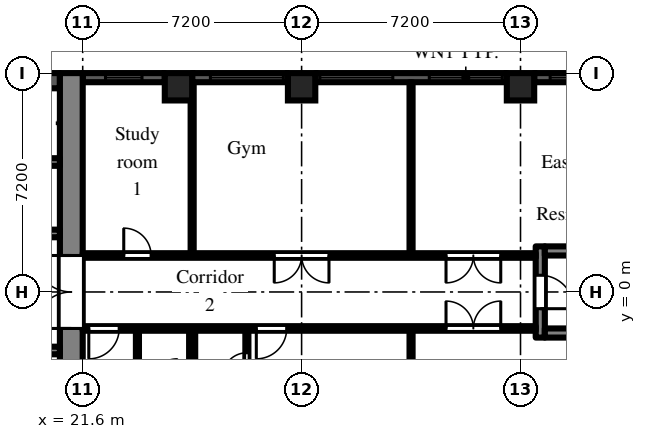
"""IFC4 building model, lengths in metres.
Left out: names, types, materials, properties, quantities, classifications, styles, units other than length and angle.
Written with IfcOpenShell. Run it as: python <this file> out.ifc"""

import sys

from ifc_helpers import new_model, si_unit, direction, frame, frame_2d, origin, origin_2d, place, context, subcontext, project, spatial, rectangle, extrude, element, fill, save


model = new_model("IFC4")
c1 = context("Model", 3, precision=1e-05, world=origin(), true_north=direction((0.0, 1.0)))
c2 = subcontext(c1, "Body", "Model", "MODEL_VIEW")
j1 = project(units=[si_unit("LENGTHUNIT", "METRE"), si_unit("PLANEANGLEUNIT", "RADIAN")], contexts=[c1])
p1 = place(None, origin())
s1 = spatial("IfcSite", under=j1, at=p1, CompositionType="ELEMENT")
p2 = place(p1, origin())
s2 = spatial("IfcBuilding", under=s1, at=p2, CompositionType="ELEMENT")
p3 = place(p2, frame((0.0, 0.0, 66.9)))
s3 = spatial("IfcBuildingStorey", under=s2, at=p3, CompositionType="ELEMENT", Elevation=66.9)
for number, where, z_axis, x_axis in (
    (1, (24.75, 6.75, 0.0), (0.0, 0.0, 1.0), (1.0, 0.0, 0.0)),
    (2, (28.8, 6.75, 0.0), (0.0, 0.0, 1.0), (1.0, 0.0, 0.0)),
    (3, (36.0, 6.75, 0.0), (0.0, 0.0, 1.0), (1.0, 0.0, 0.0)),
):
    element("IfcColumn", number, at=place(p3, frame(where, z_axis=z_axis, x_axis=x_axis)), inside=s3, PredefinedType="COLUMN", context=c2, shape_type="SweptSolid", body=[
        extrude(rectangle(XDim=0.9, YDim=0.9, at=origin_2d()), origin(), (0.0, 0.0, 1.0), 3.0),
    ])
p4 = place(p3, frame((38.7, 7.05, 0.0), z_axis=(0.0, 0.0, 1.0), x_axis=(-1.0, 0.0, 0.0)))
e4 = element("IfcWall", 4, at=p4, inside=s3, PredefinedType="SOLIDWALL", context=c2, shape_type="SweptSolid", body=[
    extrude(rectangle(XDim=2.25, YDim=0.3, at=frame_2d((1.125, 0.0))), origin(), (0.0, 0.0, 1.0), 2.1),
])
p5 = place(p4, frame((0.525, 0.0, 0.2)))
e5 = element("IfcOpeningElement", 5, at=p5, cuts=e4, PredefinedType="OPENING", context=c2, shape_type="SweptSolid", body=[
    extrude(rectangle(XDim=1.2, YDim=1.85, at=frame_2d((0.6, 0.925))), frame((0.0, 0.16, 0.0), z_axis=(0.0, -1.0, 0.0), x_axis=(1.0, 0.0, 0.0)), (0.0, 0.0, 1.0), 0.32),
])
p6 = place(p3, frame((35.55, 7.05, 0.0), z_axis=(0.0, 0.0, 1.0), x_axis=(-1.0, 0.0, 0.0)))
e6 = element("IfcWall", 6, at=p6, inside=s3, PredefinedType="SOLIDWALL", context=c2, shape_type="SweptSolid", body=[
    extrude(rectangle(XDim=6.3, YDim=0.3, at=frame_2d((3.15, 0.0))), origin(), (0.0, 0.0, 1.0), 2.1),
])
p7 = place(p6, frame((0.15, 0.0, 0.2)))
e7 = element("IfcOpeningElement", 7, at=p7, cuts=e6, PredefinedType="OPENING", context=c2, shape_type="SweptSolid", body=[
    extrude(rectangle(XDim=2.4, YDim=1.85, at=frame_2d((1.2, 0.925))), frame((0.0, 0.16, 0.0), z_axis=(0.0, -1.0, 0.0), x_axis=(1.0, 0.0, 0.0)), (0.0, 0.0, 1.0), 0.32),
])
p8 = place(p6, frame((3.75, 0.0, 0.2)))
e8 = element("IfcOpeningElement", 8, at=p8, cuts=e6, PredefinedType="OPENING", context=c2, shape_type="SweptSolid", body=[
    extrude(rectangle(XDim=2.4, YDim=1.85, at=frame_2d((1.2, 0.925))), frame((0.0, 0.16, 0.0), z_axis=(0.0, -1.0, 0.0), x_axis=(1.0, 0.0, 0.0)), (0.0, 0.0, 1.0), 0.32),
])
p9 = place(p3, frame((28.35, 7.05, 0.0), z_axis=(0.0, 0.0, 1.0), x_axis=(-1.0, 0.0, 0.0)))
e9 = element("IfcWall", 9, at=p9, inside=s3, PredefinedType="SOLIDWALL", context=c2, shape_type="SweptSolid", body=[
    extrude(rectangle(XDim=3.15, YDim=0.3, at=frame_2d((1.575, 0.0))), origin(), (0.0, 0.0, 1.0), 2.1),
])
p10 = place(p9, frame((0.15, 0.0, 0.2)))
e10 = element("IfcOpeningElement", 10, at=p10, cuts=e9, PredefinedType="OPENING", context=c2, shape_type="SweptSolid", body=[
    extrude(rectangle(XDim=2.4, YDim=1.85, at=frame_2d((1.2, 0.925))), frame((0.0, 0.16, 0.0), z_axis=(0.0, -1.0, 0.0), x_axis=(1.0, 0.0, 0.0)), (0.0, 0.0, 1.0), 0.32),
])
p11 = place(p3, frame((24.3, 7.05, 0.0), z_axis=(0.0, 0.0, 1.0), x_axis=(-1.0, 0.0, 0.0)))
e11 = element("IfcWall", 11, at=p11, inside=s3, PredefinedType="SOLIDWALL", context=c2, shape_type="SweptSolid", body=[
    extrude(rectangle(XDim=2.7, YDim=0.3, at=frame_2d((1.35, 0.0))), origin(), (0.0, 0.0, 1.0), 2.1),
])
p12 = place(p11, frame((0.75, 0.0, 0.2)))
e12 = element("IfcOpeningElement", 12, at=p12, cuts=e11, PredefinedType="OPENING", context=c2, shape_type="SweptSolid", body=[
    extrude(rectangle(XDim=1.2, YDim=1.85, at=frame_2d((0.6, 0.925))), frame((0.0, 0.16, 0.0), z_axis=(0.0, -1.0, 0.0), x_axis=(1.0, 0.0, 0.0)), (0.0, 0.0, 1.0), 0.32),
])
p13 = place(p3, frame((21.225, -7.2, 0.0), z_axis=(0.0, 0.0, 1.0), x_axis=(0.0, 1.0, 0.0)))
e13 = element("IfcWall", 13, at=p13, inside=s3, PredefinedType="SHEAR", context=c2, shape_type="SweptSolid", body=[
    extrude(rectangle(XDim=14.4, YDim=0.75, at=frame_2d((7.2, 0.0))), origin(), (0.0, 0.0, 1.0), 2.575),
])
p14 = place(p13, frame((6.0, 0.0, 0.0)))
e14 = element("IfcOpeningElement", 14, at=p14, cuts=e13, PredefinedType="OPENING", context=c2, shape_type="SweptSolid", body=[
    extrude(rectangle(XDim=2.4, YDim=2.2, at=frame_2d((1.2, 1.1))), frame((0.0, 0.385, 0.0), z_axis=(0.0, -1.0, 0.0), x_axis=(1.0, 0.0, 0.0)), (0.0, 0.0, 1.0), 0.77),
])
p15 = place(p3, frame((7.9, 6.95, 0.0), z_axis=(0.0, 0.0, 1.0), x_axis=(1.0, 0.0, 0.0)))
e15 = element("IfcWall", 15, at=p15, inside=s3, PredefinedType="SHEAR", context=c2, shape_type="SweptSolid", body=[
    extrude(rectangle(XDim=12.95, YDim=0.5, at=frame_2d((6.475, 0.0))), origin(), (0.0, 0.0, 1.0), 2.575),
])
p16 = place(p3, frame((7.9, 1.925, 0.0), z_axis=(0.0, 0.0, 1.0), x_axis=(1.0, 0.0, 0.0)))
e16 = element("IfcWall", 16, at=p16, inside=s3, PredefinedType="SHEAR", context=c2, shape_type="SweptSolid", body=[
    extrude(rectangle(XDim=12.95, YDim=0.25, at=frame_2d((6.475, 0.0))), origin(), (0.0, 0.0, 1.0), 2.575),
])
p17 = place(p16, frame((0.525, 0.0, 0.0)))
e17 = element("IfcOpeningElement", 17, at=p17, cuts=e16, PredefinedType="OPENING", context=c2, shape_type="SweptSolid", body=[
    extrude(rectangle(XDim=0.9, YDim=2.1, at=frame_2d((0.45, 1.05))), frame((0.0, 0.135, 0.0), z_axis=(0.0, -1.0, 0.0), x_axis=(1.0, 0.0, 0.0)), (0.0, 0.0, 1.0), 0.27),
])
p18 = place(p16, frame((2.625, 0.0, 0.0)))
e18 = element("IfcOpeningElement", 18, at=p18, cuts=e16, PredefinedType="OPENING", context=c2, shape_type="SweptSolid", body=[
    extrude(rectangle(XDim=1.1, YDim=2.1, at=frame_2d((0.55, 1.05))), frame((0.0, 0.135, 0.0), z_axis=(0.0, -1.0, 0.0), x_axis=(1.0, 0.0, 0.0)), (0.0, 0.0, 1.0), 0.27),
])
p19 = place(p16, frame((7.125, 0.0, 0.0)))
e19 = element("IfcOpeningElement", 19, at=p19, cuts=e16, PredefinedType="OPENING", context=c2, shape_type="SweptSolid", body=[
    extrude(rectangle(XDim=0.9, YDim=2.1, at=frame_2d((0.45, 1.05))), frame((0.0, 0.135, 0.0), z_axis=(0.0, -1.0, 0.0), x_axis=(1.0, 0.0, 0.0)), (0.0, 0.0, 1.0), 0.27),
])
p20 = place(p3, frame((12.3, 4.275, 0.0), z_axis=(0.0, 0.0, 1.0), x_axis=(1.0, 0.0, 0.0)))
e20 = element("IfcWall", 20, at=p20, inside=s3, PredefinedType="SHEAR", context=c2, shape_type="SweptSolid", body=[
    extrude(rectangle(XDim=8.55, YDim=0.25, at=frame_2d((4.275, 0.0))), origin(), (0.0, 0.0, 1.0), 2.575),
])
p21 = place(p3, frame((7.9, -1.925, 0.0), z_axis=(0.0, 0.0, 1.0), x_axis=(1.0, 0.0, 0.0)))
e21 = element("IfcWall", 21, at=p21, inside=s3, PredefinedType="SHEAR", context=c2, shape_type="SweptSolid", body=[
    extrude(rectangle(XDim=12.95, YDim=0.25, at=frame_2d((6.475, 0.0))), origin(), (0.0, 0.0, 1.0), 2.575),
])
p22 = place(p21, frame((4.825, 0.0, 0.0)))
e22 = element("IfcOpeningElement", 22, at=p22, cuts=e21, PredefinedType="OPENING", context=c2, shape_type="SweptSolid", body=[
    extrude(rectangle(XDim=1.1, YDim=2.1, at=frame_2d((0.55, 1.05))), frame((0.0, 0.135, 0.0), z_axis=(0.0, -1.0, 0.0), x_axis=(1.0, 0.0, 0.0)), (0.0, 0.0, 1.0), 0.27),
])
p23 = place(p21, frame((7.025, 0.0, 0.0)))
e23 = element("IfcOpeningElement", 23, at=p23, cuts=e21, PredefinedType="OPENING", context=c2, shape_type="SweptSolid", body=[
    extrude(rectangle(XDim=1.1, YDim=2.1, at=frame_2d((0.55, 1.05))), frame((0.0, 0.135, 0.0), z_axis=(0.0, -1.0, 0.0), x_axis=(1.0, 0.0, 0.0)), (0.0, 0.0, 1.0), 0.27),
])
p24 = place(p21, frame((9.225, 0.0, 0.0)))
e24 = element("IfcOpeningElement", 24, at=p24, cuts=e21, PredefinedType="OPENING", context=c2, shape_type="SweptSolid", body=[
    extrude(rectangle(XDim=1.1, YDim=2.1, at=frame_2d((0.55, 1.05))), frame((0.0, 0.135, 0.0), z_axis=(0.0, -1.0, 0.0), x_axis=(1.0, 0.0, 0.0)), (0.0, 0.0, 1.0), 0.27),
])
p25 = place(p21, frame((0.525, 0.0, 0.0)))
e25 = element("IfcOpeningElement", 25, at=p25, cuts=e21, PredefinedType="OPENING", context=c2, shape_type="SweptSolid", body=[
    extrude(rectangle(XDim=0.9, YDim=2.1, at=frame_2d((0.45, 1.05))), frame((0.0, 0.135, 0.0), z_axis=(0.0, -1.0, 0.0), x_axis=(1.0, 0.0, 0.0)), (0.0, 0.0, 1.0), 0.27),
])
p26 = place(p21, frame((2.625, 0.0, 0.0)))
e26 = element("IfcOpeningElement", 26, at=p26, cuts=e21, PredefinedType="OPENING", context=c2, shape_type="SweptSolid", body=[
    extrude(rectangle(XDim=1.1, YDim=2.1, at=frame_2d((0.55, 1.05))), frame((0.0, 0.135, 0.0), z_axis=(0.0, -1.0, 0.0), x_axis=(1.0, 0.0, 0.0)), (0.0, 0.0, 1.0), 0.27),
])
p27 = place(p3, frame((36.65, -1.5, 0.0), z_axis=(0.0, 0.0, 1.0), x_axis=(0.0, 1.0, 0.0)))
e27 = element("IfcWall", 27, at=p27, inside=s3, PredefinedType="SHEAR", context=c2, shape_type="SweptSolid", body=[
    extrude(rectangle(XDim=3.0, YDim=0.3, at=frame_2d((1.5, 0.0))), origin(), (0.0, 0.0, 1.0), 2.575),
])
p28 = place(p27, frame((0.95, 0.0, 0.0)))
e28 = element("IfcOpeningElement", 28, at=p28, cuts=e27, PredefinedType="OPENING", context=c2, shape_type="SweptSolid", body=[
    extrude(rectangle(XDim=1.1, YDim=2.1, at=frame_2d((0.55, 1.05))), frame((0.0, 0.16, 0.0), z_axis=(0.0, -1.0, 0.0), x_axis=(1.0, 0.0, 0.0)), (0.0, 0.0, 1.0), 0.32),
])
for number, where, z_axis, x_axis in (
    (29, (36.8, -1.35, 0.0), (0.0, 0.0, 1.0), (1.0, 0.0, 0.0)),
    (30, (36.8, 1.35, 0.0), (0.0, 0.0, 1.0), (1.0, 0.0, 0.0)),
):
    element("IfcWall", number, at=place(p3, frame(where, z_axis=z_axis, x_axis=x_axis)), inside=s3, PredefinedType="SHEAR", context=c2, shape_type="SweptSolid", body=[
        extrude(rectangle(XDim=5.8, YDim=0.3, at=frame_2d((2.9, 0.0))), origin(), (0.0, 0.0, 1.0), 2.575),
    ])
p29 = place(p3, frame((21.6, -1.2, 0.0), z_axis=(0.0, 0.0, 1.0), x_axis=(1.0, 0.0, 0.0)))
e31 = element("IfcWall", 31, at=p29, inside=s3, PredefinedType="PARTITIONING", context=c2, shape_type="SweptSolid", body=[
    extrude(rectangle(XDim=14.9, YDim=0.15, at=frame_2d((7.45, 0.0))), origin(), (0.0, 0.0, 1.0), 2.575),
])
p30 = place(p29, frame((0.2, 0.0, 0.0)))
e32 = element("IfcOpeningElement", 32, at=p30, cuts=e31, PredefinedType="OPENING", context=c2, shape_type="SweptSolid", body=[
    extrude(rectangle(XDim=1.0, YDim=2.1, at=frame_2d((0.5, 1.05))), frame((0.0, 0.085, 0.0), z_axis=(0.0, -1.0, 0.0), x_axis=(1.0, 0.0, 0.0)), (0.0, 0.0, 1.0), 0.17),
])
p31 = place(p29, frame((5.71, 0.0, 0.0)))
e33 = element("IfcOpeningElement", 33, at=p31, cuts=e31, PredefinedType="OPENING", context=c2, shape_type="SweptSolid", body=[
    extrude(rectangle(XDim=1.0, YDim=2.1, at=frame_2d((0.5, 1.05))), frame((0.0, 0.085, 0.0), z_axis=(0.0, -1.0, 0.0), x_axis=(1.0, 0.0, 0.0)), (0.0, 0.0, 1.0), 0.17),
])
p32 = place(p29, frame((11.95, 0.0, 0.0)))
e34 = element("IfcOpeningElement", 34, at=p32, cuts=e31, PredefinedType="OPENING", context=c2, shape_type="SweptSolid", body=[
    extrude(rectangle(XDim=1.8, YDim=2.1, at=frame_2d((0.9, 1.05))), frame((0.0, 0.085, 0.0), z_axis=(0.0, -1.0, 0.0), x_axis=(1.0, 0.0, 0.0)), (0.0, 0.0, 1.0), 0.17),
])
p33 = place(p3, frame((21.6, 1.2, 0.0), z_axis=(0.0, 0.0, 1.0), x_axis=(1.0, 0.0, 0.0)))
e35 = element("IfcWall", 35, at=p33, inside=s3, PredefinedType="PARTITIONING", context=c2, shape_type="SweptSolid", body=[
    extrude(rectangle(XDim=14.9, YDim=0.15, at=frame_2d((7.45, 0.0))), origin(), (0.0, 0.0, 1.0), 2.575),
])
p34 = place(p33, frame((1.35, 0.0, 0.0)))
e36 = element("IfcOpeningElement", 36, at=p34, cuts=e35, PredefinedType="OPENING", context=c2, shape_type="SweptSolid", body=[
    extrude(rectangle(XDim=0.9, YDim=2.1, at=frame_2d((0.45, 1.05))), frame((0.0, 0.085, 0.0), z_axis=(0.0, -1.0, 0.0), x_axis=(1.0, 0.0, 0.0)), (0.0, 0.0, 1.0), 0.17),
])
p35 = place(p33, frame((6.3, 0.0, 0.0)))
e37 = element("IfcOpeningElement", 37, at=p35, cuts=e35, PredefinedType="OPENING", context=c2, shape_type="SweptSolid", body=[
    extrude(rectangle(XDim=1.8, YDim=2.1, at=frame_2d((0.9, 1.05))), frame((0.0, 0.085, 0.0), z_axis=(0.0, -1.0, 0.0), x_axis=(1.0, 0.0, 0.0)), (0.0, 0.0, 1.0), 0.17),
])
p36 = place(p33, frame((11.95, 0.0, 0.0)))
e38 = element("IfcOpeningElement", 38, at=p36, cuts=e35, PredefinedType="OPENING", context=c2, shape_type="SweptSolid", body=[
    extrude(rectangle(XDim=1.8, YDim=2.1, at=frame_2d((0.9, 1.05))), frame((0.0, 0.085, 0.0), z_axis=(0.0, -1.0, 0.0), x_axis=(1.0, 0.0, 0.0)), (0.0, 0.0, 1.0), 0.17),
])
p37 = place(p3, frame((23.4, -3.05, 0.0), z_axis=(0.0, 0.0, 1.0), x_axis=(0.0, 1.0, 0.0)))
e39 = element("IfcWall", 39, at=p37, inside=s3, PredefinedType="PARTITIONING", context=c2, shape_type="SweptSolid", body=[
    extrude(rectangle(XDim=1.775, YDim=0.1, at=frame_2d((0.888, 0.0))), origin(), (0.0, 0.0, 1.0), 2.575),
])
p38 = place(p3, frame((25.2, -6.9, 0.0), z_axis=(0.0, 0.0, 1.0), x_axis=(0.0, 1.0, 0.0)))
e40 = element("IfcWall", 40, at=p38, inside=s3, PredefinedType="PARTITIONING", context=c2, shape_type="SweptSolid", body=[
    extrude(rectangle(XDim=5.625, YDim=0.2, at=frame_2d((2.812, 0.0))), origin(), (0.0, 0.0, 1.0), 2.575),
])
p39 = place(p3, frame((25.2, 1.275, 0.0), z_axis=(0.0, 0.0, 1.0), x_axis=(0.0, 1.0, 0.0)))
e41 = element("IfcWall", 41, at=p39, inside=s3, PredefinedType="PARTITIONING", context=c2, shape_type="SweptSolid", body=[
    extrude(rectangle(XDim=5.625, YDim=0.1, at=frame_2d((2.812, 0.0))), origin(), (0.0, 0.0, 1.0), 2.575),
])
p40 = place(p3, frame((27.0, -3.55, 0.0), z_axis=(0.0, 0.0, 1.0), x_axis=(0.0, 1.0, 0.0)))
e42 = element("IfcWall", 42, at=p40, inside=s3, PredefinedType="PARTITIONING", context=c2, shape_type="SweptSolid", body=[
    extrude(rectangle(XDim=2.275, YDim=0.1, at=frame_2d((1.138, 0.0))), origin(), (0.0, 0.0, 1.0), 2.575),
])
p41 = place(p40, frame((0.75, 0.0, 0.0)))
e43 = element("IfcOpeningElement", 43, at=p41, cuts=e42, PredefinedType="OPENING", context=c2, shape_type="SweptSolid", body=[
    extrude(rectangle(XDim=0.8, YDim=2.1, at=frame_2d((0.4, 1.05))), frame((0.0, 0.06, 0.0), z_axis=(0.0, -1.0, 0.0), x_axis=(1.0, 0.0, 0.0)), (0.0, 0.0, 1.0), 0.12),
])
for number, where, z_axis, x_axis in (
    (44, (32.4, -6.9, 0.0), (0.0, 0.0, 1.0), (0.0, 1.0, 0.0)),
    (45, (32.4, 1.275, 0.0), (0.0, 0.0, 1.0), (0.0, 1.0, 0.0)),
):
    element("IfcWall", number, at=place(p3, frame(where, z_axis=z_axis, x_axis=x_axis)), inside=s3, PredefinedType="PARTITIONING", context=c2, shape_type="SweptSolid", body=[
        extrude(rectangle(XDim=5.625, YDim=0.1, at=frame_2d((2.812, 0.0))), origin(), (0.0, 0.0, 1.0), 2.575),
    ])
p42 = place(p5, origin())
e46 = element("IfcWindow", 46, at=p42, inside=s3, PartitioningType="SINGLE_PANEL", PredefinedType="WINDOW", context=c2, shape_type="SweptSolid", body=[
    extrude(rectangle(XDim=1.2, YDim=1.85, at=frame_2d((0.6, 0.925))), frame((0.0, 0.03, 0.0), z_axis=(0.0, -1.0, 0.0), x_axis=(1.0, 0.0, 0.0)), (0.0, 0.0, 1.0), 0.06),
])
fill(e5, e46)
p43 = place(p7, origin())
e47 = element("IfcWindow", 47, at=p43, inside=s3, PartitioningType="SINGLE_PANEL", PredefinedType="WINDOW", context=c2, shape_type="SweptSolid", body=[
    extrude(rectangle(XDim=2.4, YDim=1.85, at=frame_2d((1.2, 0.925))), frame((0.0, 0.03, 0.0), z_axis=(0.0, -1.0, 0.0), x_axis=(1.0, 0.0, 0.0)), (0.0, 0.0, 1.0), 0.06),
])
fill(e7, e47)
p44 = place(p8, origin())
e48 = element("IfcWindow", 48, at=p44, inside=s3, PartitioningType="SINGLE_PANEL", PredefinedType="WINDOW", context=c2, shape_type="SweptSolid", body=[
    extrude(rectangle(XDim=2.4, YDim=1.85, at=frame_2d((1.2, 0.925))), frame((0.0, 0.03, 0.0), z_axis=(0.0, -1.0, 0.0), x_axis=(1.0, 0.0, 0.0)), (0.0, 0.0, 1.0), 0.06),
])
fill(e8, e48)
p45 = place(p10, origin())
e49 = element("IfcWindow", 49, at=p45, inside=s3, PartitioningType="SINGLE_PANEL", PredefinedType="WINDOW", context=c2, shape_type="SweptSolid", body=[
    extrude(rectangle(XDim=2.4, YDim=1.85, at=frame_2d((1.2, 0.925))), frame((0.0, 0.03, 0.0), z_axis=(0.0, -1.0, 0.0), x_axis=(1.0, 0.0, 0.0)), (0.0, 0.0, 1.0), 0.06),
])
fill(e10, e49)
p46 = place(p12, origin())
e50 = element("IfcWindow", 50, at=p46, inside=s3, PartitioningType="SINGLE_PANEL", PredefinedType="WINDOW", context=c2, shape_type="SweptSolid", body=[
    extrude(rectangle(XDim=1.2, YDim=1.85, at=frame_2d((0.6, 0.925))), frame((0.0, 0.03, 0.0), z_axis=(0.0, -1.0, 0.0), x_axis=(1.0, 0.0, 0.0)), (0.0, 0.0, 1.0), 0.06),
])
fill(e12, e50)
p47 = place(p14, origin())
e51 = element("IfcDoor", 51, at=p47, inside=s3, OperationType="DOUBLE_DOOR_DOUBLE_SWING", PredefinedType="DOOR", context=c2, shape_type="SweptSolid", body=[
    extrude(rectangle(XDim=2.4, YDim=2.2, at=frame_2d((1.2, 1.1))), frame((0.0, 0.025, 0.0), z_axis=(0.0, -1.0, 0.0), x_axis=(1.0, 0.0, 0.0)), (0.0, 0.0, 1.0), 0.05),
])
fill(e14, e51)
p48 = place(p28, frame((1.1, 0.0, 0.0), z_axis=(0.0, 0.0, 1.0), x_axis=(-1.0, 0.0, 0.0)))
e52 = element("IfcDoor", 52, at=p48, inside=s3, OperationType="SINGLE_SWING_RIGHT", PredefinedType="DOOR", context=c2, shape_type="SweptSolid", body=[
    extrude(rectangle(XDim=1.1, YDim=2.1, at=frame_2d((0.55, 1.05))), frame((0.0, 0.025, 0.0), z_axis=(0.0, -1.0, 0.0), x_axis=(1.0, 0.0, 0.0)), (0.0, 0.0, 1.0), 0.05),
])
fill(e28, e52)
p49 = place(p34, origin())
e53 = element("IfcDoor", 53, at=p49, inside=s3, OperationType="SINGLE_SWING_LEFT", PredefinedType="DOOR", context=c2, shape_type="SweptSolid", body=[
    extrude(rectangle(XDim=0.9, YDim=2.1, at=frame_2d((0.45, 1.05))), frame((0.0, 0.025, 0.0), z_axis=(0.0, -1.0, 0.0), x_axis=(1.0, 0.0, 0.0)), (0.0, 0.0, 1.0), 0.05),
])
fill(e36, e53)
p50 = place(p35, frame((1.8, 0.0, 0.0), z_axis=(0.0, 0.0, 1.0), x_axis=(-1.0, 0.0, 0.0)))
e54 = element("IfcDoor", 54, at=p50, inside=s3, OperationType="DOUBLE_DOOR_DOUBLE_SWING", PredefinedType="DOOR", context=c2, shape_type="SweptSolid", body=[
    extrude(rectangle(XDim=1.8, YDim=2.1, at=frame_2d((0.9, 1.05))), frame((0.0, 0.025, 0.0), z_axis=(0.0, -1.0, 0.0), x_axis=(1.0, 0.0, 0.0)), (0.0, 0.0, 1.0), 0.05),
])
fill(e37, e54)
p51 = place(p36, frame((1.8, 0.0, 0.0), z_axis=(0.0, 0.0, 1.0), x_axis=(-1.0, 0.0, 0.0)))
e55 = element("IfcDoor", 55, at=p51, inside=s3, OperationType="DOUBLE_DOOR_DOUBLE_SWING", PredefinedType="DOOR", context=c2, shape_type="SweptSolid", body=[
    extrude(rectangle(XDim=1.8, YDim=2.1, at=frame_2d((0.9, 1.05))), frame((0.0, 0.025, 0.0), z_axis=(0.0, -1.0, 0.0), x_axis=(1.0, 0.0, 0.0)), (0.0, 0.0, 1.0), 0.05),
])
fill(e38, e55)
p52 = place(p30, frame((1.0, 0.0, 0.0), z_axis=(0.0, 0.0, 1.0), x_axis=(-1.0, 0.0, 0.0)))
e56 = element("IfcDoor", 56, at=p52, inside=s3, OperationType="SINGLE_SWING_RIGHT", PredefinedType="DOOR", context=c2, shape_type="SweptSolid", body=[
    extrude(rectangle(XDim=1.0, YDim=2.1, at=frame_2d((0.5, 1.05))), frame((0.0, 0.025, 0.0), z_axis=(0.0, -1.0, 0.0), x_axis=(1.0, 0.0, 0.0)), (0.0, 0.0, 1.0), 0.05),
])
fill(e32, e56)
p53 = place(p41, origin())
e57 = element("IfcDoor", 57, at=p53, inside=s3, OperationType="SINGLE_SWING_LEFT", PredefinedType="DOOR", context=c2, shape_type="SweptSolid", body=[
    extrude(rectangle(XDim=0.8, YDim=2.1, at=frame_2d((0.4, 1.05))), frame((0.0, 0.025, 0.0), z_axis=(0.0, -1.0, 0.0), x_axis=(1.0, 0.0, 0.0)), (0.0, 0.0, 1.0), 0.05),
])
fill(e43, e57)
p54 = place(p31, frame((1.0, 0.0, 0.0), z_axis=(0.0, 0.0, 1.0), x_axis=(-1.0, 0.0, 0.0)))
e58 = element("IfcDoor", 58, at=p54, inside=s3, OperationType="SINGLE_SWING_RIGHT", PredefinedType="DOOR", context=c2, shape_type="SweptSolid", body=[
    extrude(rectangle(XDim=1.0, YDim=2.1, at=frame_2d((0.5, 1.05))), frame((0.0, 0.025, 0.0), z_axis=(0.0, -1.0, 0.0), x_axis=(1.0, 0.0, 0.0)), (0.0, 0.0, 1.0), 0.05),
])
fill(e33, e58)
p55 = place(p32, origin())
e59 = element("IfcDoor", 59, at=p55, inside=s3, OperationType="DOUBLE_DOOR_DOUBLE_SWING", PredefinedType="DOOR", context=c2, shape_type="SweptSolid", body=[
    extrude(rectangle(XDim=1.8, YDim=2.1, at=frame_2d((0.9, 1.05))), frame((0.0, 0.025, 0.0), z_axis=(0.0, -1.0, 0.0), x_axis=(1.0, 0.0, 0.0)), (0.0, 0.0, 1.0), 0.05),
])
fill(e34, e59)
save(model, sys.argv[1])
